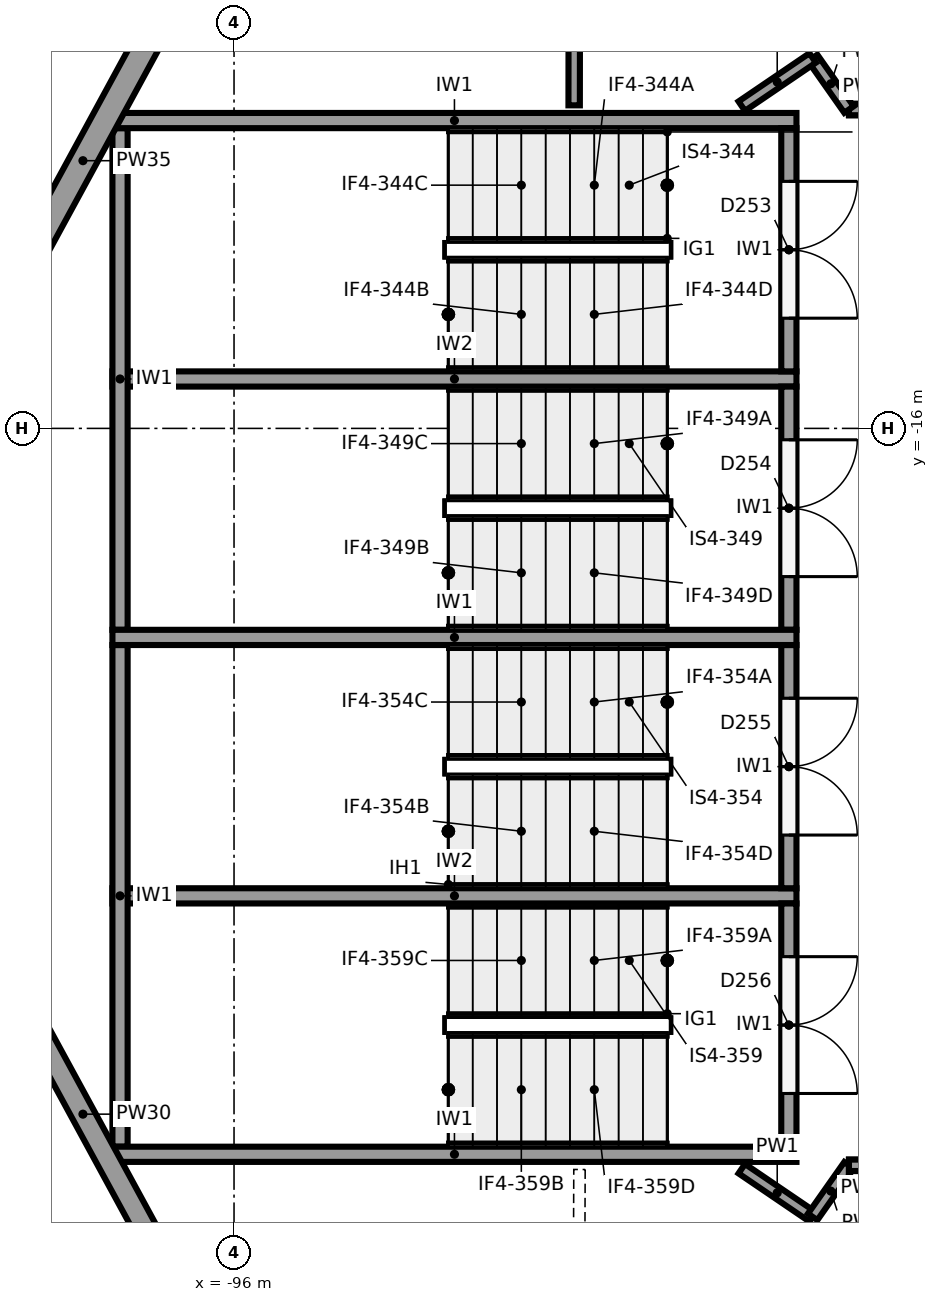
"""IFC4 building model, lengths in metres.
Left out: names, types, materials, properties, quantities, classifications, styles, units other than length and angle.
Written with IfcOpenShell. Run it as: python <this file> out.ifc"""

import sys

from ifc_helpers import new_model, si_unit, direction, frame, frame_2d, origin, place, context, subcontext, project, spatial, rectangle, extrude, element, fill, save


model = new_model("IFC4")
c1 = context("Model", 3, precision=1e-05, world=origin(), true_north=direction((0.0, 1.0)))
c2 = subcontext(c1, "Body", "Model", "MODEL_VIEW")
j1 = project(units=[si_unit("LENGTHUNIT", "METRE"), si_unit("PLANEANGLEUNIT", "RADIAN")], contexts=[c1])
p1 = place(None, origin())
s1 = spatial("IfcSite", under=j1, at=p1, CompositionType="ELEMENT")
p2 = place(p1, origin())
s2 = spatial("IfcBuilding", under=s1, at=p2, CompositionType="ELEMENT")
p3 = place(p2, frame((0.0, 0.0, 12.0)))
s3 = spatial("IfcBuildingStorey", under=s2, at=p3, CompositionType="ELEMENT", Elevation=12.0)
p4 = place(p3, frame((-101.161, -18.311, 0.0), z_axis=(0.0, 0.0, 1.0), x_axis=(0.477867771117, 0.878431780691, 0.0)))
e1 = element("IfcWall", 1, at=p4, inside=s3, PredefinedType="SOLIDWALL", context=c2, shape_type="SweptSolid", body=[
    extrude(rectangle(XDim=13.28, YDim=0.35, at=frame_2d((6.64, 0.0))), origin(), (0.0, 0.0, 1.0), 4.35),
])
p5 = place(p4, frame((11.63, 0.0, 1.0)))
e2 = element("IfcOpeningElement", 2, at=p5, cuts=e1, PredefinedType="OPENING", context=c2, shape_type="SweptSolid", body=[
    extrude(rectangle(XDim=0.9, YDim=3.25, at=frame_2d((0.45, 1.625))), frame((0.0, 0.185, 0.0), z_axis=(0.0, -1.0, 0.0), x_axis=(1.0, 0.0, 0.0)), (0.0, 0.0, 1.0), 0.37),
])
p6 = place(p4, frame((9.53, 0.0, 1.0)))
e3 = element("IfcOpeningElement", 3, at=p6, cuts=e1, PredefinedType="OPENING", context=c2, shape_type="SweptSolid", body=[
    extrude(rectangle(XDim=0.9, YDim=3.25, at=frame_2d((0.45, 1.625))), frame((0.0, 0.185, 0.0), z_axis=(0.0, -1.0, 0.0), x_axis=(1.0, 0.0, 0.0)), (0.0, 0.0, 1.0), 0.37),
])
p7 = place(p4, frame((1.13, 0.0, 1.0)))
e4 = element("IfcOpeningElement", 4, at=p7, cuts=e1, PredefinedType="OPENING", context=c2, shape_type="SweptSolid", body=[
    extrude(rectangle(XDim=0.9, YDim=3.25, at=frame_2d((0.45, 1.625))), frame((0.0, 0.185, 0.0), z_axis=(0.0, -1.0, 0.0), x_axis=(1.0, 0.0, 0.0)), (0.0, 0.0, 1.0), 0.37),
])
p8 = place(p3, frame((-94.815, -30.855, 0.0), z_axis=(0.0, 0.0, 1.0), x_axis=(-0.477867771117, 0.878431780691, 0.0)))
e5 = element("IfcWall", 5, at=p8, inside=s3, PredefinedType="SOLIDWALL", context=c2, shape_type="SweptSolid", body=[
    extrude(rectangle(XDim=13.28, YDim=0.3, at=frame_2d((6.64, 0.0))), origin(), (0.0, 0.0, 1.0), 4.35),
])
for number, where, z_axis, x_axis in (
    (6, (-97.6, -11.95, 0.0), (0.0, 0.0, 1.0), (1.0, 0.0, 0.0)),
    (7, (-97.6, -18.75, 0.0), (0.0, 0.0, 1.0), (1.0, 0.0, 0.0)),
    (8, (-97.6, -25.55, 0.0), (0.0, 0.0, 1.0), (1.0, 0.0, 0.0)),
):
    element("IfcWall", number, at=place(p3, frame(where, z_axis=z_axis, x_axis=x_axis)), inside=s3, PredefinedType="SHEAR", context=c2, shape_type="SweptSolid", body=[
        extrude(rectangle(XDim=9.0, YDim=0.2, at=frame_2d((4.5, 0.0))), origin(), (0.0, 0.0, 1.0), 5.65),
    ])
for number, where, z_axis, x_axis in (
    (9, (-97.5, -12.05, 0.0), (0.0, 0.0, 1.0), (0.0, -1.0, 0.0)),
    (10, (-97.5, -18.85, 0.0), (0.0, 0.0, 1.0), (0.0, -1.0, 0.0)),
):
    element("IfcWall", number, at=place(p3, frame(where, z_axis=z_axis, x_axis=x_axis)), inside=s3, PredefinedType="SHEAR", context=c2, shape_type="SweptSolid", body=[
        extrude(rectangle(XDim=6.6, YDim=0.2, at=frame_2d((3.3, 0.0))), origin(), (0.0, 0.0, 1.0), 5.65),
    ])
for number, where, z_axis, x_axis in (
    (11, (-97.6, -15.35, 0.0), (0.0, 0.0, 1.0), (1.0, 0.0, 0.0)),
    (12, (-97.6, -22.15, 0.0), (0.0, 0.0, 1.0), (1.0, 0.0, 0.0)),
):
    element("IfcWall", number, at=place(p3, frame(where, z_axis=z_axis, x_axis=x_axis)), inside=s3, PredefinedType="SHEAR", context=c2, shape_type="SweptSolid", body=[
        extrude(rectangle(XDim=9.0, YDim=0.2, at=frame_2d((4.5, 0.0))), origin(), (0.0, 0.0, 1.0), 5.65),
    ])
p9 = place(p3, frame((-88.7, -12.05, 0.0), z_axis=(0.0, 0.0, 1.0), x_axis=(0.0, -1.0, 0.0)))
e13 = element("IfcWall", 13, at=p9, inside=s3, PredefinedType="SHEAR", context=c2, shape_type="SweptSolid", body=[
    extrude(rectangle(XDim=3.2, YDim=0.2, at=frame_2d((1.6, 0.0))), origin(), (0.0, 0.0, 1.0), 5.65),
])
p10 = place(p9, frame((0.7, 0.0, 0.0)))
e14 = element("IfcOpeningElement", 14, at=p10, cuts=e13, PredefinedType="OPENING", context=c2, shape_type="SweptSolid", body=[
    extrude(rectangle(XDim=1.8, YDim=2.1, at=frame_2d((0.9, 1.05))), frame((0.0, 0.11, 0.0), z_axis=(0.0, -1.0, 0.0), x_axis=(1.0, 0.0, 0.0)), (0.0, 0.0, 1.0), 0.22),
])
p11 = place(p3, frame((-88.7, -15.45, 0.0), z_axis=(0.0, 0.0, 1.0), x_axis=(0.0, -1.0, 0.0)))
e15 = element("IfcWall", 15, at=p11, inside=s3, PredefinedType="SHEAR", context=c2, shape_type="SweptSolid", body=[
    extrude(rectangle(XDim=3.2, YDim=0.2, at=frame_2d((1.6, 0.0))), origin(), (0.0, 0.0, 1.0), 5.65),
])
p12 = place(p11, frame((0.7, 0.0, 0.0)))
e16 = element("IfcOpeningElement", 16, at=p12, cuts=e15, PredefinedType="OPENING", context=c2, shape_type="SweptSolid", body=[
    extrude(rectangle(XDim=1.8, YDim=2.1, at=frame_2d((0.9, 1.05))), frame((0.0, 0.11, 0.0), z_axis=(0.0, -1.0, 0.0), x_axis=(1.0, 0.0, 0.0)), (0.0, 0.0, 1.0), 0.22),
])
p13 = place(p3, frame((-88.7, -18.85, 0.0), z_axis=(0.0, 0.0, 1.0), x_axis=(0.0, -1.0, 0.0)))
e17 = element("IfcWall", 17, at=p13, inside=s3, PredefinedType="SHEAR", context=c2, shape_type="SweptSolid", body=[
    extrude(rectangle(XDim=3.2, YDim=0.2, at=frame_2d((1.6, 0.0))), origin(), (0.0, 0.0, 1.0), 5.65),
])
p14 = place(p13, frame((0.7, 0.0, 0.0)))
e18 = element("IfcOpeningElement", 18, at=p14, cuts=e17, PredefinedType="OPENING", context=c2, shape_type="SweptSolid", body=[
    extrude(rectangle(XDim=1.8, YDim=2.1, at=frame_2d((0.9, 1.05))), frame((0.0, 0.11, 0.0), z_axis=(0.0, -1.0, 0.0), x_axis=(1.0, 0.0, 0.0)), (0.0, 0.0, 1.0), 0.22),
])
p15 = place(p3, frame((-88.7, -22.25, 0.0), z_axis=(0.0, 0.0, 1.0), x_axis=(0.0, -1.0, 0.0)))
e19 = element("IfcWall", 19, at=p15, inside=s3, PredefinedType="SHEAR", context=c2, shape_type="SweptSolid", body=[
    extrude(rectangle(XDim=3.2, YDim=0.2, at=frame_2d((1.6, 0.0))), origin(), (0.0, 0.0, 1.0), 5.65),
])
p16 = place(p15, frame((0.7, 0.0, 0.0)))
e20 = element("IfcOpeningElement", 20, at=p16, cuts=e19, PredefinedType="OPENING", context=c2, shape_type="SweptSolid", body=[
    extrude(rectangle(XDim=1.8, YDim=2.1, at=frame_2d((0.9, 1.05))), frame((0.0, 0.11, 0.0), z_axis=(0.0, -1.0, 0.0), x_axis=(1.0, 0.0, 0.0)), (0.0, 0.0, 1.0), 0.22),
])
p17 = place(p3, frame((-91.519, -6.967, 0.0), z_axis=(0.0, 0.0, 1.0), x_axis=(-0.001174067593, -0.999999310782, 0.0)))
e21 = element("IfcWall", 21, at=p17, inside=s3, PredefinedType="PARTITIONING", context=c2, shape_type="SweptSolid", body=[
    extrude(rectangle(XDim=4.783, YDim=0.15, at=frame_2d((2.391, 0.0))), origin(), (0.0, 0.0, 1.0), 5.65),
])
p18 = place(p3, frame((-91.455, -25.75, 0.0), z_axis=(0.0, 0.0, 1.0), x_axis=(-0.003886987998, -0.999992445634, 0.0)))
e22 = element("IfcWall", 22, at=p18, inside=s3, PredefinedType="PARTITIONING", context=c2, shape_type="SweptSolid", body=[
    extrude(rectangle(XDim=4.711, YDim=0.15, at=frame_2d((2.355, 0.0))), origin(), (0.0, 0.0, 1.0), 5.65),
])
p19 = place(p18, frame((1.95, 0.0, 0.0)))
e23 = element("IfcOpeningElement", 23, at=p19, cuts=e22, PredefinedType="OPENING", context=c2, shape_type="SweptSolid", body=[
    extrude(rectangle(XDim=1.0, YDim=2.1, at=frame_2d((0.5, 1.05))), frame((0.0, 0.085, 0.0), z_axis=(0.0, -1.0, 0.0), x_axis=(1.0, 0.0, 0.0)), (0.0, 0.0, 1.0), 0.17),
])
p20 = place(p3, frame((-89.32, -25.74, 0.0), z_axis=(0.0, 0.0, 1.0), x_axis=(0.827055308354, -0.562120553728, 0.0)))
e24 = element("IfcWall", 24, at=p20, inside=s3, PredefinedType="PARTITIONING", context=c2, shape_type="SweptSolid", body=[
    extrude(rectangle(XDim=1.128, YDim=0.15, at=frame_2d((0.564, 0.0))), origin(), (0.0, 0.0, 1.0), 5.65),
])
p21 = place(p3, frame((-88.387, -26.374, 0.0), z_axis=(0.0, 0.0, 1.0), x_axis=(0.575376756214, 0.817888493872, 0.0)))
e25 = element("IfcWall", 25, at=p21, inside=s3, PredefinedType="PARTITIONING", context=c2, shape_type="SweptSolid", body=[
    extrude(rectangle(XDim=0.83, YDim=0.15, at=frame_2d((0.415, 0.0))), origin(), (0.0, 0.0, 1.0), 5.65),
])
p22 = place(p3, frame((-87.909, -25.695, 0.0), z_axis=(0.0, 0.0, 1.0), x_axis=(1.0, 0.0, 0.0)))
e26 = element("IfcWall", 26, at=p22, inside=s3, PredefinedType="PARTITIONING", context=c2, shape_type="SweptSolid", body=[
    extrude(rectangle(XDim=3.704, YDim=0.15, at=frame_2d((1.852, 0.0))), origin(), (0.0, 0.0, 1.0), 4.55),
])
p23 = place(p22, frame((0.65, 0.0, 0.0)))
e27 = element("IfcOpeningElement", 27, at=p23, cuts=e26, PredefinedType="OPENING", context=c2, shape_type="SweptSolid", body=[
    extrude(rectangle(XDim=1.8, YDim=2.1, at=frame_2d((0.9, 1.05))), frame((0.0, 0.085, 0.0), z_axis=(0.0, -1.0, 0.0), x_axis=(1.0, 0.0, 0.0)), (0.0, 0.0, 1.0), 0.17),
])
p24 = place(p3, frame((-87.909, -25.695, 4.55), z_axis=(0.0, 0.0, 1.0), x_axis=(1.0, 0.0, 0.0)))
e28 = element("IfcWall", 28, at=p24, inside=s3, PredefinedType="PARTITIONING", context=c2, shape_type="SweptSolid", body=[
    extrude(rectangle(XDim=0.6, YDim=0.15, at=frame_2d((0.3, 0.0))), origin(), (0.0, 0.0, 1.0), 1.1),
])
p25 = place(p3, frame((-81.555, -11.805, 0.0), z_axis=(0.0, 0.0, 1.0), x_axis=(-1.0, 0.0, 0.0)))
e29 = element("IfcWall", 29, at=p25, inside=s3, PredefinedType="PARTITIONING", context=c2, shape_type="SweptSolid", body=[
    extrude(rectangle(XDim=6.354, YDim=0.15, at=frame_2d((3.177, 0.0))), origin(), (0.0, 0.0, 1.0), 4.55),
])
p26 = place(p25, frame((3.85, 0.0, 0.0)))
e30 = element("IfcOpeningElement", 30, at=p26, cuts=e29, PredefinedType="OPENING", context=c2, shape_type="SweptSolid", body=[
    extrude(rectangle(XDim=1.8, YDim=2.1, at=frame_2d((0.9, 1.05))), frame((0.0, 0.085, 0.0), z_axis=(0.0, -1.0, 0.0), x_axis=(1.0, 0.0, 0.0)), (0.0, 0.0, 1.0), 0.17),
])
p27 = place(p3, frame((-87.255, -11.805, 4.55), z_axis=(0.0, 0.0, 1.0), x_axis=(-1.0, 0.0, 0.0)))
e31 = element("IfcWall", 31, at=p27, inside=s3, PredefinedType="PARTITIONING", context=c2, shape_type="SweptSolid", body=[
    extrude(rectangle(XDim=0.654, YDim=0.15, at=frame_2d((0.327, 0.0))), origin(), (0.0, 0.0, 1.0), 1.1),
])
p28 = place(p3, frame((-87.909, -11.805, 0.0), z_axis=(0.0, 0.0, 1.0), x_axis=(-0.575573582652, 0.81774999294, 0.0)))
e32 = element("IfcWall", 32, at=p28, inside=s3, PredefinedType="PARTITIONING", context=c2, shape_type="SweptSolid", body=[
    extrude(rectangle(XDim=0.83, YDim=0.15, at=frame_2d((0.415, 0.0))), origin(), (0.0, 0.0, 1.0), 5.65),
])
p29 = place(p3, frame((-88.387, -11.126, 0.0), z_axis=(0.0, 0.0, 1.0), x_axis=(-0.827055308354, -0.562120553728, 0.0)))
e33 = element("IfcWall", 33, at=p29, inside=s3, PredefinedType="PARTITIONING", context=c2, shape_type="SweptSolid", body=[
    extrude(rectangle(XDim=1.128, YDim=0.15, at=frame_2d((0.564, 0.0))), origin(), (0.0, 0.0, 1.0), 5.65),
])
p30 = place(p10, origin())
e34 = element("IfcDoor", 34, at=p30, inside=s3, OperationType="DOUBLE_DOOR_SINGLE_SWING", PredefinedType="DOOR", context=c2, shape_type="SweptSolid", body=[
    extrude(rectangle(XDim=1.8, YDim=2.1, at=frame_2d((0.9, 1.05))), frame((0.0, 0.025, 0.0), z_axis=(0.0, -1.0, 0.0), x_axis=(1.0, 0.0, 0.0)), (0.0, 0.0, 1.0), 0.05),
])
fill(e14, e34)
p31 = place(p12, origin())
e35 = element("IfcDoor", 35, at=p31, inside=s3, OperationType="DOUBLE_DOOR_SINGLE_SWING", PredefinedType="DOOR", context=c2, shape_type="SweptSolid", body=[
    extrude(rectangle(XDim=1.8, YDim=2.1, at=frame_2d((0.9, 1.05))), frame((0.0, 0.025, 0.0), z_axis=(0.0, -1.0, 0.0), x_axis=(1.0, 0.0, 0.0)), (0.0, 0.0, 1.0), 0.05),
])
fill(e16, e35)
p32 = place(p14, origin())
e36 = element("IfcDoor", 36, at=p32, inside=s3, OperationType="DOUBLE_DOOR_SINGLE_SWING", PredefinedType="DOOR", context=c2, shape_type="SweptSolid", body=[
    extrude(rectangle(XDim=1.8, YDim=2.1, at=frame_2d((0.9, 1.05))), frame((0.0, 0.025, 0.0), z_axis=(0.0, -1.0, 0.0), x_axis=(1.0, 0.0, 0.0)), (0.0, 0.0, 1.0), 0.05),
])
fill(e18, e36)
p33 = place(p16, origin())
e37 = element("IfcDoor", 37, at=p33, inside=s3, OperationType="DOUBLE_DOOR_SINGLE_SWING", PredefinedType="DOOR", context=c2, shape_type="SweptSolid", body=[
    extrude(rectangle(XDim=1.8, YDim=2.1, at=frame_2d((0.9, 1.05))), frame((0.0, 0.025, 0.0), z_axis=(0.0, -1.0, 0.0), x_axis=(1.0, 0.0, 0.0)), (0.0, 0.0, 1.0), 0.05),
])
fill(e20, e37)
save(model, sys.argv[1])
